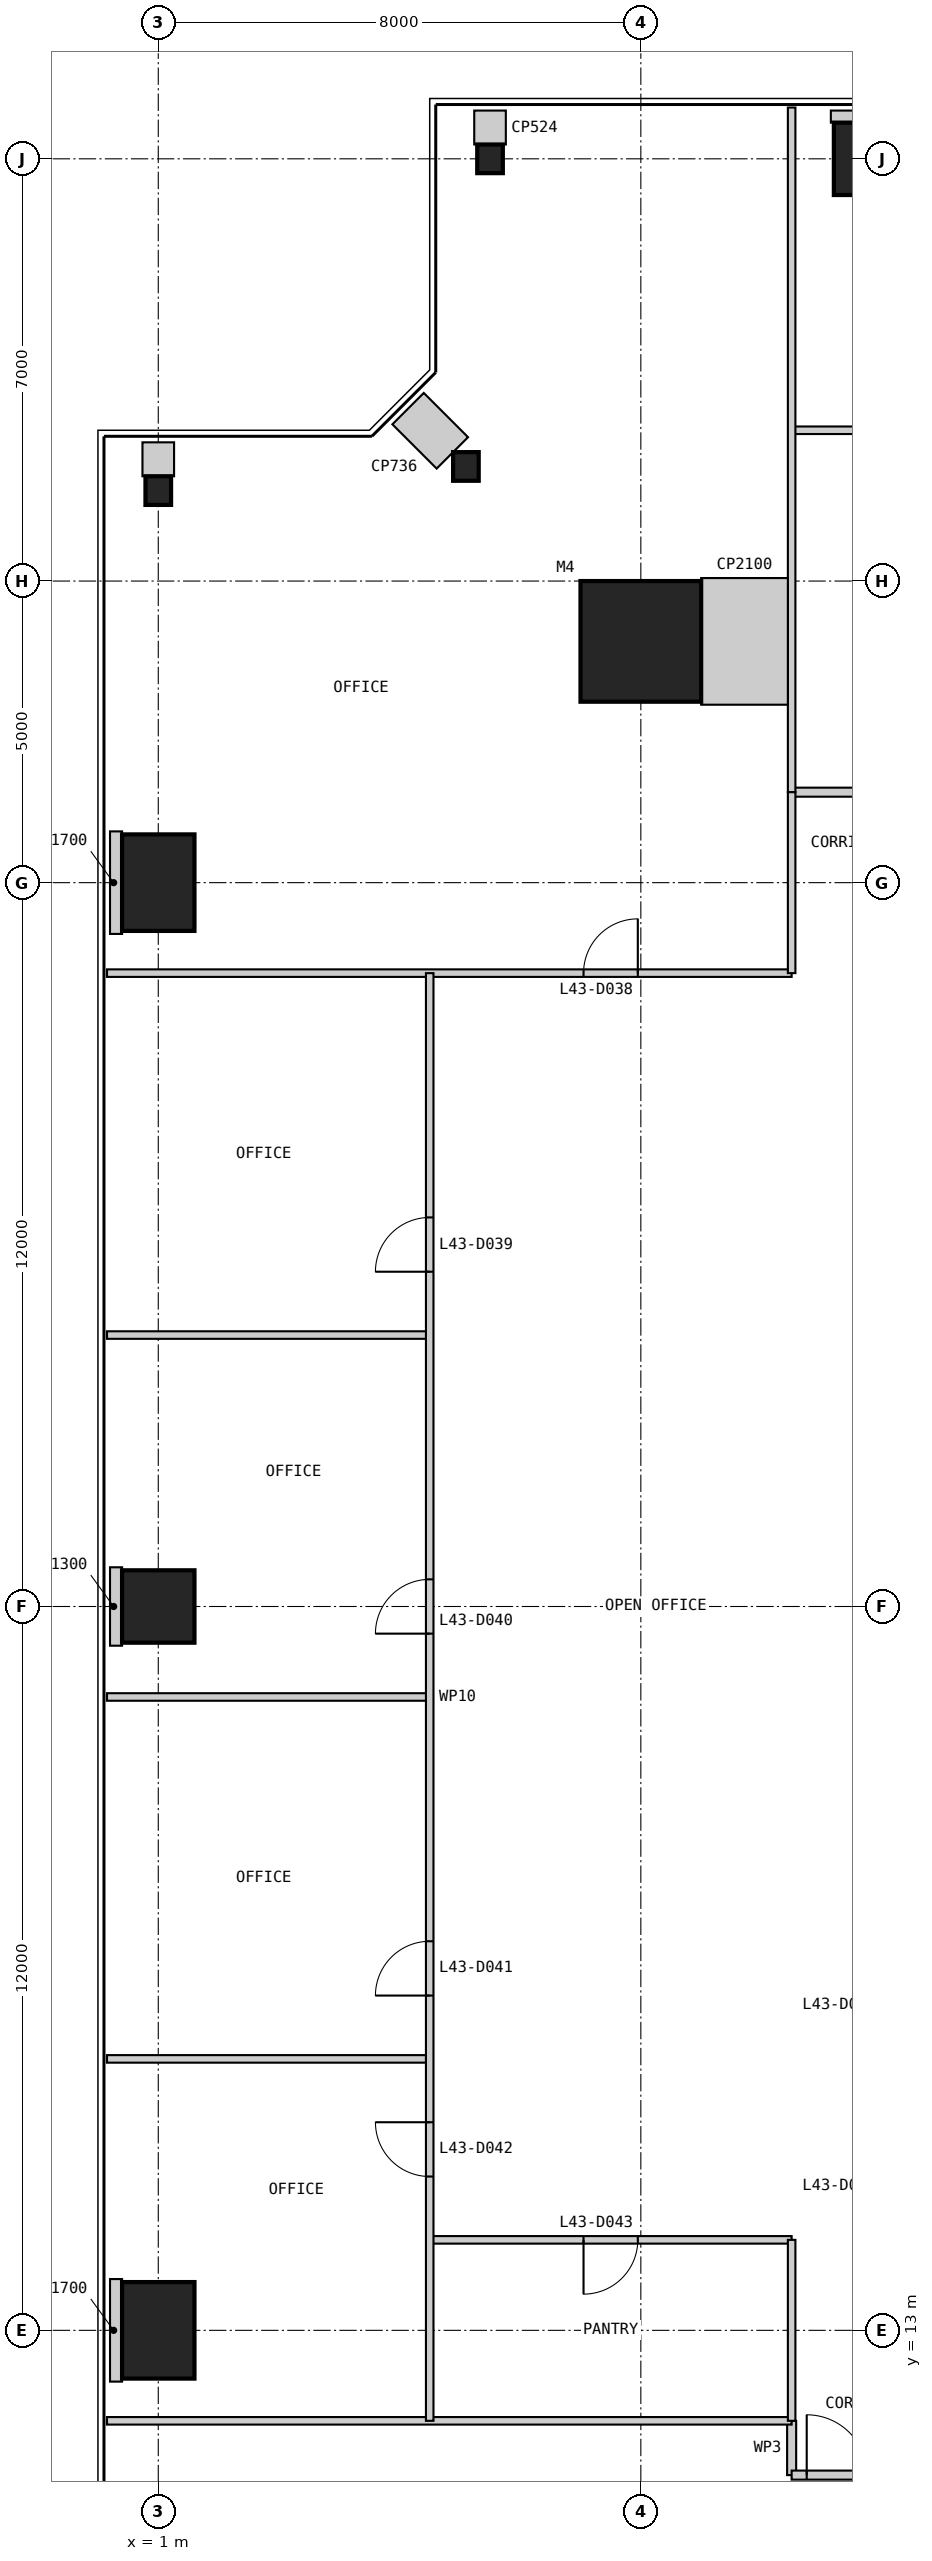
"""IFC4 building model, lengths in metres.
Left out: names, types, materials, properties, quantities, classifications, styles, units other than length and angle.
Written with IfcOpenShell. Run it as: python <this file> out.ifc"""

import sys

from ifc_helpers import new_model, si_unit, direction, frame, frame_2d, origin, origin_2d, place, context, subcontext, project, spatial, rectangle, i_section, extrude, element, fill, save


model = new_model("IFC4")
c1 = context("Model", 3, precision=1e-05, world=origin(), true_north=direction((0.0, 1.0)))
c2 = subcontext(c1, "Body", "Model", "MODEL_VIEW")
j1 = project(units=[si_unit("LENGTHUNIT", "METRE"), si_unit("PLANEANGLEUNIT", "RADIAN")], contexts=[c1])
p1 = place(None, origin())
s1 = spatial("IfcSite", under=j1, at=p1, CompositionType="ELEMENT")
p2 = place(p1, origin())
s2 = spatial("IfcBuilding", under=s1, at=p2, CompositionType="ELEMENT")
p3 = place(p2, frame((0.0, 0.0, 185.8)))
s3 = spatial("IfcBuildingStorey", under=s2, at=p3, CompositionType="ELEMENT", Elevation=185.8)
p4 = place(p3, frame((9.0, 41.0, 0.0), z_axis=(0.0, 0.0, 1.0), x_axis=(1.0, 0.0, 0.0)))
e1 = element("IfcColumn", 1, at=p4, inside=s3, PredefinedType="COLUMN", context=c2, shape_type="SweptSolid", body=[
    extrude(rectangle(XDim=2.0, YDim=2.0, at=origin_2d()), origin(), (0.0, 0.0, 1.0), 4.0),
])
p5 = place(p3, frame((13.0, 49.0, 0.0), z_axis=(0.0, 0.0, 1.0), x_axis=(1.0, 0.0, 0.0)))
e2 = element("IfcColumn", 2, at=p5, inside=s3, PredefinedType="COLUMN", context=c2, shape_type="SweptSolid", body=[
    extrude(rectangle(XDim=1.6, YDim=1.2, at=origin_2d()), origin(), (0.0, 0.0, 1.0), 4.0),
])
for number, where, z_axis, x_axis in (
    (3, (6.5, 49.0, 0.0), (0.0, 0.0, 1.0), (1.0, 0.0, 0.0)),
    (4, (6.1, 43.9, 0.0), (0.0, 0.0, 1.0), (1.0, 0.0, 0.0)),
    (5, (1.0, 43.5, 0.0), (0.0, 0.0, 1.0), (1.0, 0.0, 0.0)),
):
    element("IfcColumn", number, at=place(p3, frame(where, z_axis=z_axis, x_axis=x_axis)), inside=s3, PredefinedType="COLUMN", context=c2, shape_type="SweptSolid", body=[
        extrude(i_section(OverallWidth=0.424, OverallDepth=0.475, WebThickness=0.048, FlangeThickness=0.077, at=origin_2d()), origin(), (0.0, 0.0, 1.0), 4.0),
    ])
p6 = place(p3, frame((1.0, 37.0, 0.0), z_axis=(0.0, 0.0, 1.0), x_axis=(1.0, 0.0, 0.0)))
e6 = element("IfcColumn", 6, at=p6, inside=s3, PredefinedType="COLUMN", context=c2, shape_type="SweptSolid", body=[
    extrude(rectangle(XDim=1.2, YDim=1.6, at=origin_2d()), origin(), (0.0, 0.0, 1.0), 4.0),
])
p7 = place(p3, frame((1.0, 25.0, 0.0), z_axis=(0.0, 0.0, 1.0), x_axis=(1.0, 0.0, 0.0)))
e7 = element("IfcColumn", 7, at=p7, inside=s3, PredefinedType="COLUMN", context=c2, shape_type="SweptSolid", body=[
    extrude(rectangle(XDim=1.2, YDim=1.2, at=origin_2d()), origin(), (0.0, 0.0, 1.0), 4.0),
])
p8 = place(p3, frame((1.0, 13.0, 0.0), z_axis=(0.0, 0.0, 1.0), x_axis=(1.0, 0.0, 0.0)))
e8 = element("IfcColumn", 8, at=p8, inside=s3, PredefinedType="COLUMN", context=c2, shape_type="SweptSolid", body=[
    extrude(rectangle(XDim=1.2, YDim=1.6, at=origin_2d()), origin(), (0.0, 0.0, 1.0), 4.0),
])
p9 = place(p3, frame((11.5, 11.5, 0.0), z_axis=(0.0, 0.0, 1.0), x_axis=(0.0, -1.0, 0.0)))
e9 = element("IfcWall", 9, at=p9, inside=s3, PredefinedType="PARTITIONING", context=c2, shape_type="SweptSolid", body=[
    extrude(rectangle(XDim=0.9, YDim=0.15, at=frame_2d((0.45, 0.0))), origin(), (0.0, 0.0, 1.0), 3.85),
])
p10 = place(p3, frame((11.5, 10.6, 0.0), z_axis=(0.0, 0.0, 1.0), x_axis=(1.0, 0.0, 0.0)))
e10 = element("IfcWall", 10, at=p10, inside=s3, PredefinedType="PARTITIONING", context=c2, shape_type="SweptSolid", body=[
    extrude(rectangle(XDim=27.0, YDim=0.15, at=frame_2d((13.5, 0.0))), origin(), (0.0, 0.0, 1.0), 3.85),
])
p11 = place(p10, frame((12.25, 0.0, 0.0)))
e11 = element("IfcOpeningElement", 11, at=p11, cuts=e10, PredefinedType="OPENING", context=c2, shape_type="SweptSolid", body=[
    extrude(rectangle(XDim=1.0, YDim=2.2, at=frame_2d((0.5, 1.1))), frame((0.0, 0.085, 0.0), z_axis=(0.0, -1.0, 0.0), x_axis=(1.0, 0.0, 0.0)), (0.0, 0.0, 1.0), 0.17),
])
p12 = place(p10, frame((19.75, 0.0, 0.0)))
e12 = element("IfcOpeningElement", 12, at=p12, cuts=e10, PredefinedType="OPENING", context=c2, shape_type="SweptSolid", body=[
    extrude(rectangle(XDim=1.0, YDim=2.2, at=frame_2d((0.5, 1.1))), frame((0.0, 0.085, 0.0), z_axis=(0.0, -1.0, 0.0), x_axis=(1.0, 0.0, 0.0)), (0.0, 0.0, 1.0), 0.17),
])
p13 = place(p10, frame((0.25, 0.0, 0.0)))
e13 = element("IfcOpeningElement", 13, at=p13, cuts=e10, PredefinedType="OPENING", context=c2, shape_type="SweptSolid", body=[
    extrude(rectangle(XDim=1.0, YDim=2.2, at=frame_2d((0.5, 1.1))), frame((0.0, 0.085, 0.0), z_axis=(0.0, -1.0, 0.0), x_axis=(1.0, 0.0, 0.0)), (0.0, 0.0, 1.0), 0.17),
])
p14 = place(p10, frame((10.75, 0.0, 0.0)))
e14 = element("IfcOpeningElement", 14, at=p14, cuts=e10, PredefinedType="OPENING", context=c2, shape_type="SweptSolid", body=[
    extrude(rectangle(XDim=1.0, YDim=2.2, at=frame_2d((0.5, 1.1))), frame((0.0, 0.085, 0.0), z_axis=(0.0, -1.0, 0.0), x_axis=(1.0, 0.0, 0.0)), (0.0, 0.0, 1.0), 0.17),
])
p15 = place(p10, frame((22.0, 0.0, 0.0)))
e15 = element("IfcOpeningElement", 15, at=p15, cuts=e10, PredefinedType="OPENING", context=c2, shape_type="SweptSolid", body=[
    extrude(rectangle(XDim=1.0, YDim=2.2, at=frame_2d((0.5, 1.1))), frame((0.0, 0.085, 0.0), z_axis=(0.0, -1.0, 0.0), x_axis=(1.0, 0.0, 0.0)), (0.0, 0.0, 1.0), 0.17),
])
p16 = place(p10, frame((25.0, 0.0, 0.0)))
e16 = element("IfcOpeningElement", 16, at=p16, cuts=e10, PredefinedType="OPENING", context=c2, shape_type="SweptSolid", body=[
    extrude(rectangle(XDim=1.0, YDim=2.2, at=frame_2d((0.5, 1.1))), frame((0.0, 0.085, 0.0), z_axis=(0.0, -1.0, 0.0), x_axis=(1.0, 0.0, 0.0)), (0.0, 0.0, 1.0), 0.17),
])
p17 = place(p3, frame((0.15, 11.5, 0.0), z_axis=(0.0, 0.0, 1.0), x_axis=(1.0, 0.0, 0.0)))
e17 = element("IfcWall", 17, at=p17, inside=s3, PredefinedType="PARTITIONING", context=c2, shape_type="SweptSolid", body=[
    extrude(rectangle(XDim=11.35, YDim=0.125, at=frame_2d((5.675, 0.0))), origin(), (0.0, 0.0, 1.0), 3.85),
])
p18 = place(p3, frame((38.5, 38.5, 0.0), z_axis=(0.0, 0.0, 1.0), x_axis=(-1.0, 0.0, 0.0)))
e18 = element("IfcWall", 18, at=p18, inside=s3, PredefinedType="PARTITIONING", context=c2, shape_type="SweptSolid", body=[
    extrude(rectangle(XDim=27.0, YDim=0.15, at=frame_2d((13.5, 0.0))), origin(), (0.0, 0.0, 1.0), 3.85),
])
p19 = place(p18, frame((13.0, 0.0, 0.0)))
e19 = element("IfcOpeningElement", 19, at=p19, cuts=e18, PredefinedType="OPENING", context=c2, shape_type="SweptSolid", body=[
    extrude(rectangle(XDim=1.0, YDim=2.2, at=frame_2d((0.5, 1.1))), frame((0.0, 0.085, 0.0), z_axis=(0.0, -1.0, 0.0), x_axis=(1.0, 0.0, 0.0)), (0.0, 0.0, 1.0), 0.17),
])
p20 = place(p3, frame((35.5, 44.5, 0.0), z_axis=(0.0, 0.0, 1.0), x_axis=(-1.0, 0.0, 0.0)))
e20 = element("IfcWall", 20, at=p20, inside=s3, PredefinedType="PARTITIONING", context=c2, shape_type="SweptSolid", body=[
    extrude(rectangle(XDim=24.0, YDim=0.125, at=frame_2d((12.0, 0.0))), origin(), (0.0, 0.0, 1.0), 3.85),
])
p21 = place(p20, frame((4.05, 0.0, 0.0)))
e21 = element("IfcOpeningElement", 21, at=p21, cuts=e20, PredefinedType="OPENING", context=c2, shape_type="SweptSolid", body=[
    extrude(rectangle(XDim=0.9, YDim=2.2, at=frame_2d((0.45, 1.1))), frame((0.0, 0.073, 0.0), z_axis=(0.0, -1.0, 0.0), x_axis=(1.0, 0.0, 0.0)), (0.0, 0.0, 1.0), 0.145),
])
p22 = place(p20, frame((10.05, 0.0, 0.0)))
e22 = element("IfcOpeningElement", 22, at=p22, cuts=e20, PredefinedType="OPENING", context=c2, shape_type="SweptSolid", body=[
    extrude(rectangle(XDim=0.9, YDim=2.2, at=frame_2d((0.45, 1.1))), frame((0.0, 0.073, 0.0), z_axis=(0.0, -1.0, 0.0), x_axis=(1.0, 0.0, 0.0)), (0.0, 0.0, 1.0), 0.145),
])
p23 = place(p20, frame((16.05, 0.0, 0.0)))
e23 = element("IfcOpeningElement", 23, at=p23, cuts=e20, PredefinedType="OPENING", context=c2, shape_type="SweptSolid", body=[
    extrude(rectangle(XDim=0.9, YDim=2.2, at=frame_2d((0.45, 1.1))), frame((0.0, 0.073, 0.0), z_axis=(0.0, -1.0, 0.0), x_axis=(1.0, 0.0, 0.0)), (0.0, 0.0, 1.0), 0.145),
])
p24 = place(p20, frame((19.05, 0.0, 0.0)))
e24 = element("IfcOpeningElement", 24, at=p24, cuts=e20, PredefinedType="OPENING", context=c2, shape_type="SweptSolid", body=[
    extrude(rectangle(XDim=0.9, YDim=2.2, at=frame_2d((0.45, 1.1))), frame((0.0, 0.073, 0.0), z_axis=(0.0, -1.0, 0.0), x_axis=(1.0, 0.0, 0.0)), (0.0, 0.0, 1.0), 0.145),
])
p25 = place(p3, frame((11.5, 49.85, 0.0), z_axis=(0.0, 0.0, 1.0), x_axis=(0.0, -1.0, 0.0)))
e25 = element("IfcWall", 25, at=p25, inside=s3, PredefinedType="PARTITIONING", context=c2, shape_type="SweptSolid", body=[
    extrude(rectangle(XDim=11.35, YDim=0.125, at=frame_2d((5.675, 0.0))), origin(), (0.0, 0.0, 1.0), 3.85),
])
p26 = place(p3, frame((0.15, 35.5, 0.0), z_axis=(0.0, 0.0, 1.0), x_axis=(1.0, 0.0, 0.0)))
e26 = element("IfcWall", 26, at=p26, inside=s3, PredefinedType="PARTITIONING", context=c2, shape_type="SweptSolid", body=[
    extrude(rectangle(XDim=11.35, YDim=0.125, at=frame_2d((5.675, 0.0))), origin(), (0.0, 0.0, 1.0), 3.85),
])
p27 = place(p26, frame((7.9, 0.0, 0.0)))
e27 = element("IfcOpeningElement", 27, at=p27, cuts=e26, PredefinedType="OPENING", context=c2, shape_type="SweptSolid", body=[
    extrude(rectangle(XDim=0.9, YDim=2.2, at=frame_2d((0.45, 1.1))), frame((0.0, 0.073, 0.0), z_axis=(0.0, -1.0, 0.0), x_axis=(1.0, 0.0, 0.0)), (0.0, 0.0, 1.0), 0.145),
])
for number, where, z_axis, x_axis in (
    (28, (0.15, 29.5, 0.0), (0.0, 0.0, 1.0), (1.0, 0.0, 0.0)),
    (29, (0.15, 23.5, 0.0), (0.0, 0.0, 1.0), (1.0, 0.0, 0.0)),
    (30, (0.15, 17.5, 0.0), (0.0, 0.0, 1.0), (1.0, 0.0, 0.0)),
):
    element("IfcWall", number, at=place(p3, frame(where, z_axis=z_axis, x_axis=x_axis)), inside=s3, PredefinedType="PARTITIONING", context=c2, shape_type="SweptSolid", body=[
        extrude(rectangle(XDim=5.35, YDim=0.125, at=frame_2d((2.675, 0.0))), origin(), (0.0, 0.0, 1.0), 3.85),
    ])
p28 = place(p3, frame((5.5, 14.5, 0.0), z_axis=(0.0, 0.0, 1.0), x_axis=(1.0, 0.0, 0.0)))
e31 = element("IfcWall", 31, at=p28, inside=s3, PredefinedType="PARTITIONING", context=c2, shape_type="SweptSolid", body=[
    extrude(rectangle(XDim=6.0, YDim=0.125, at=frame_2d((3.0, 0.0))), origin(), (0.0, 0.0, 1.0), 3.85),
])
p29 = place(p28, frame((2.55, 0.0, 0.0)))
e32 = element("IfcOpeningElement", 32, at=p29, cuts=e31, PredefinedType="OPENING", context=c2, shape_type="SweptSolid", body=[
    extrude(rectangle(XDim=0.9, YDim=2.2, at=frame_2d((0.45, 1.1))), frame((0.0, 0.073, 0.0), z_axis=(0.0, -1.0, 0.0), x_axis=(1.0, 0.0, 0.0)), (0.0, 0.0, 1.0), 0.145),
])
p30 = place(p3, frame((5.5, 35.5, 0.0), z_axis=(0.0, 0.0, 1.0), x_axis=(0.0, -1.0, 0.0)))
e33 = element("IfcWall", 33, at=p30, inside=s3, PredefinedType="PARTITIONING", context=c2, shape_type="SweptSolid", body=[
    extrude(rectangle(XDim=24.0, YDim=0.125, at=frame_2d((12.0, 0.0))), origin(), (0.0, 0.0, 1.0), 3.85),
])
p31 = place(p30, frame((4.05, 0.0, 0.0)))
e34 = element("IfcOpeningElement", 34, at=p31, cuts=e33, PredefinedType="OPENING", context=c2, shape_type="SweptSolid", body=[
    extrude(rectangle(XDim=0.9, YDim=2.2, at=frame_2d((0.45, 1.1))), frame((0.0, 0.073, 0.0), z_axis=(0.0, -1.0, 0.0), x_axis=(1.0, 0.0, 0.0)), (0.0, 0.0, 1.0), 0.145),
])
p32 = place(p30, frame((10.05, 0.0, 0.0)))
e35 = element("IfcOpeningElement", 35, at=p32, cuts=e33, PredefinedType="OPENING", context=c2, shape_type="SweptSolid", body=[
    extrude(rectangle(XDim=0.9, YDim=2.2, at=frame_2d((0.45, 1.1))), frame((0.0, 0.073, 0.0), z_axis=(0.0, -1.0, 0.0), x_axis=(1.0, 0.0, 0.0)), (0.0, 0.0, 1.0), 0.145),
])
p33 = place(p30, frame((16.05, 0.0, 0.0)))
e36 = element("IfcOpeningElement", 36, at=p33, cuts=e33, PredefinedType="OPENING", context=c2, shape_type="SweptSolid", body=[
    extrude(rectangle(XDim=0.9, YDim=2.2, at=frame_2d((0.45, 1.1))), frame((0.0, 0.073, 0.0), z_axis=(0.0, -1.0, 0.0), x_axis=(1.0, 0.0, 0.0)), (0.0, 0.0, 1.0), 0.145),
])
p34 = place(p30, frame((19.05, 0.0, 0.0)))
e37 = element("IfcOpeningElement", 37, at=p34, cuts=e33, PredefinedType="OPENING", context=c2, shape_type="SweptSolid", body=[
    extrude(rectangle(XDim=0.9, YDim=2.2, at=frame_2d((0.45, 1.1))), frame((0.0, 0.073, 0.0), z_axis=(0.0, -1.0, 0.0), x_axis=(1.0, 0.0, 0.0)), (0.0, 0.0, 1.0), 0.145),
])
for number, where, z_axis, x_axis in (
    (38, (11.5, 38.5, 0.0), (0.0, 0.0, 1.0), (0.0, -1.0, 0.0)),
    (39, (11.5, 14.5, 0.0), (0.0, 0.0, 1.0), (0.0, -1.0, 0.0)),
):
    element("IfcWall", number, at=place(p3, frame(where, z_axis=z_axis, x_axis=x_axis)), inside=s3, PredefinedType="PARTITIONING", context=c2, shape_type="SweptSolid", body=[
        extrude(rectangle(XDim=3.0, YDim=0.125, at=frame_2d((1.5, 0.0))), origin(), (0.0, 0.0, 1.0), 3.85),
    ])
p35 = place(p3, frame((13.0, 49.8, 0.0), z_axis=(0.0, 0.0, 1.0), x_axis=(0.0, -1.0, 0.0)))
e40 = element("IfcWall", 40, at=p35, inside=s3, PredefinedType="PARTITIONING", context=c2, shape_type="SweptSolid", body=[
    extrude(rectangle(XDim=0.2, YDim=1.7, at=frame_2d((0.1, 0.0))), origin(), (0.0, 0.0, 1.0), 3.85),
])
p36 = place(p3, frame((11.438, 41.0, 0.0), z_axis=(0.0, 0.0, 1.0), x_axis=(-1.0, 0.0, 0.0)))
e41 = element("IfcWall", 41, at=p36, inside=s3, PredefinedType="PARTITIONING", context=c2, shape_type="SweptSolid", body=[
    extrude(rectangle(XDim=1.438, YDim=2.1, at=frame_2d((0.719, 0.0))), origin(), (0.0, 0.0, 1.0), 3.85),
])
p37 = place(p3, frame((6.5, 49.8, 0.0), z_axis=(0.0, 0.0, 1.0), x_axis=(0.0, -1.0, 0.0)))
e42 = element("IfcWall", 42, at=p37, inside=s3, PredefinedType="PARTITIONING", context=c2, shape_type="SweptSolid", body=[
    extrude(rectangle(XDim=0.562, YDim=0.524, at=frame_2d((0.281, 0.0))), origin(), (0.0, 0.0, 1.0), 3.85),
])
p38 = place(p3, frame((5.141, 44.859, 0.0), z_axis=(0.0, 0.0, 1.0), x_axis=(0.707106781187, -0.707106781187, 0.0)))
e43 = element("IfcWall", 43, at=p38, inside=s3, PredefinedType="PARTITIONING", context=c2, shape_type="SweptSolid", body=[
    extrude(rectangle(XDim=1.038, YDim=0.736, at=frame_2d((0.519, 0.0))), origin(), (0.0, 0.0, 1.0), 3.85),
])
p39 = place(p3, frame((1.0, 44.3, 0.0), z_axis=(0.0, 0.0, 1.0), x_axis=(0.0, -1.0, 0.0)))
e44 = element("IfcWall", 44, at=p39, inside=s3, PredefinedType="PARTITIONING", context=c2, shape_type="SweptSolid", body=[
    extrude(rectangle(XDim=0.562, YDim=0.524, at=frame_2d((0.281, 0.0))), origin(), (0.0, 0.0, 1.0), 3.85),
])
p40 = place(p3, frame((0.2, 37.0, 0.0), z_axis=(0.0, 0.0, 1.0), x_axis=(1.0, 0.0, 0.0)))
e45 = element("IfcWall", 45, at=p40, inside=s3, PredefinedType="PARTITIONING", context=c2, shape_type="SweptSolid", body=[
    extrude(rectangle(XDim=0.2, YDim=1.7, at=frame_2d((0.1, 0.0))), origin(), (0.0, 0.0, 1.0), 3.85),
])
p41 = place(p3, frame((0.2, 25.0, 0.0), z_axis=(0.0, 0.0, 1.0), x_axis=(1.0, 0.0, 0.0)))
e46 = element("IfcWall", 46, at=p41, inside=s3, PredefinedType="PARTITIONING", context=c2, shape_type="SweptSolid", body=[
    extrude(rectangle(XDim=0.2, YDim=1.3, at=frame_2d((0.1, 0.0))), origin(), (0.0, 0.0, 1.0), 3.85),
])
p42 = place(p3, frame((0.2, 13.0, 0.0), z_axis=(0.0, 0.0, 1.0), x_axis=(1.0, 0.0, 0.0)))
e47 = element("IfcWall", 47, at=p42, inside=s3, PredefinedType="PARTITIONING", context=c2, shape_type="SweptSolid", body=[
    extrude(rectangle(XDim=0.2, YDim=1.7, at=frame_2d((0.1, 0.0))), origin(), (0.0, 0.0, 1.0), 3.85),
])
p43 = place(p13, origin())
e48 = element("IfcDoor", 48, at=p43, inside=s3, OperationType="SINGLE_SWING_LEFT", PredefinedType="DOOR", context=c2, shape_type="SweptSolid", body=[
    extrude(rectangle(XDim=1.0, YDim=2.2, at=frame_2d((0.5, 1.1))), frame((0.0, 0.025, 0.0), z_axis=(0.0, -1.0, 0.0), x_axis=(1.0, 0.0, 0.0)), (0.0, 0.0, 1.0), 0.05),
])
fill(e13, e48)
p44 = place(p27, origin())
e49 = element("IfcDoor", 49, at=p44, inside=s3, OperationType="SINGLE_SWING_RIGHT", PredefinedType="DOOR", context=c2, shape_type="SweptSolid", body=[
    extrude(rectangle(XDim=0.9, YDim=2.2, at=frame_2d((0.45, 1.1))), frame((0.0, 0.025, 0.0), z_axis=(0.0, -1.0, 0.0), x_axis=(1.0, 0.0, 0.0)), (0.0, 0.0, 1.0), 0.05),
])
fill(e27, e49)
p45 = place(p31, frame((0.9, 0.0, 0.0), z_axis=(0.0, 0.0, 1.0), x_axis=(-1.0, 0.0, 0.0)))
e50 = element("IfcDoor", 50, at=p45, inside=s3, OperationType="SINGLE_SWING_LEFT", PredefinedType="DOOR", context=c2, shape_type="SweptSolid", body=[
    extrude(rectangle(XDim=0.9, YDim=2.2, at=frame_2d((0.45, 1.1))), frame((0.0, 0.025, 0.0), z_axis=(0.0, -1.0, 0.0), x_axis=(1.0, 0.0, 0.0)), (0.0, 0.0, 1.0), 0.05),
])
fill(e34, e50)
p46 = place(p32, frame((0.9, 0.0, 0.0), z_axis=(0.0, 0.0, 1.0), x_axis=(-1.0, 0.0, 0.0)))
e51 = element("IfcDoor", 51, at=p46, inside=s3, OperationType="SINGLE_SWING_LEFT", PredefinedType="DOOR", context=c2, shape_type="SweptSolid", body=[
    extrude(rectangle(XDim=0.9, YDim=2.2, at=frame_2d((0.45, 1.1))), frame((0.0, 0.025, 0.0), z_axis=(0.0, -1.0, 0.0), x_axis=(1.0, 0.0, 0.0)), (0.0, 0.0, 1.0), 0.05),
])
fill(e35, e51)
p47 = place(p33, frame((0.9, 0.0, 0.0), z_axis=(0.0, 0.0, 1.0), x_axis=(-1.0, 0.0, 0.0)))
e52 = element("IfcDoor", 52, at=p47, inside=s3, OperationType="SINGLE_SWING_LEFT", PredefinedType="DOOR", context=c2, shape_type="SweptSolid", body=[
    extrude(rectangle(XDim=0.9, YDim=2.2, at=frame_2d((0.45, 1.1))), frame((0.0, 0.025, 0.0), z_axis=(0.0, -1.0, 0.0), x_axis=(1.0, 0.0, 0.0)), (0.0, 0.0, 1.0), 0.05),
])
fill(e36, e52)
p48 = place(p34, frame((0.9, 0.0, 0.0), z_axis=(0.0, 0.0, 1.0), x_axis=(-1.0, 0.0, 0.0)))
e53 = element("IfcDoor", 53, at=p48, inside=s3, OperationType="SINGLE_SWING_RIGHT", PredefinedType="DOOR", context=c2, shape_type="SweptSolid", body=[
    extrude(rectangle(XDim=0.9, YDim=2.2, at=frame_2d((0.45, 1.1))), frame((0.0, 0.025, 0.0), z_axis=(0.0, -1.0, 0.0), x_axis=(1.0, 0.0, 0.0)), (0.0, 0.0, 1.0), 0.05),
])
fill(e37, e53)
p49 = place(p29, frame((0.9, 0.0, 0.0), z_axis=(0.0, 0.0, 1.0), x_axis=(-1.0, 0.0, 0.0)))
e54 = element("IfcDoor", 54, at=p49, inside=s3, OperationType="SINGLE_SWING_RIGHT", PredefinedType="DOOR", context=c2, shape_type="SweptSolid", body=[
    extrude(rectangle(XDim=0.9, YDim=2.2, at=frame_2d((0.45, 1.1))), frame((0.0, 0.025, 0.0), z_axis=(0.0, -1.0, 0.0), x_axis=(1.0, 0.0, 0.0)), (0.0, 0.0, 1.0), 0.05),
])
fill(e32, e54)
save(model, sys.argv[1])
